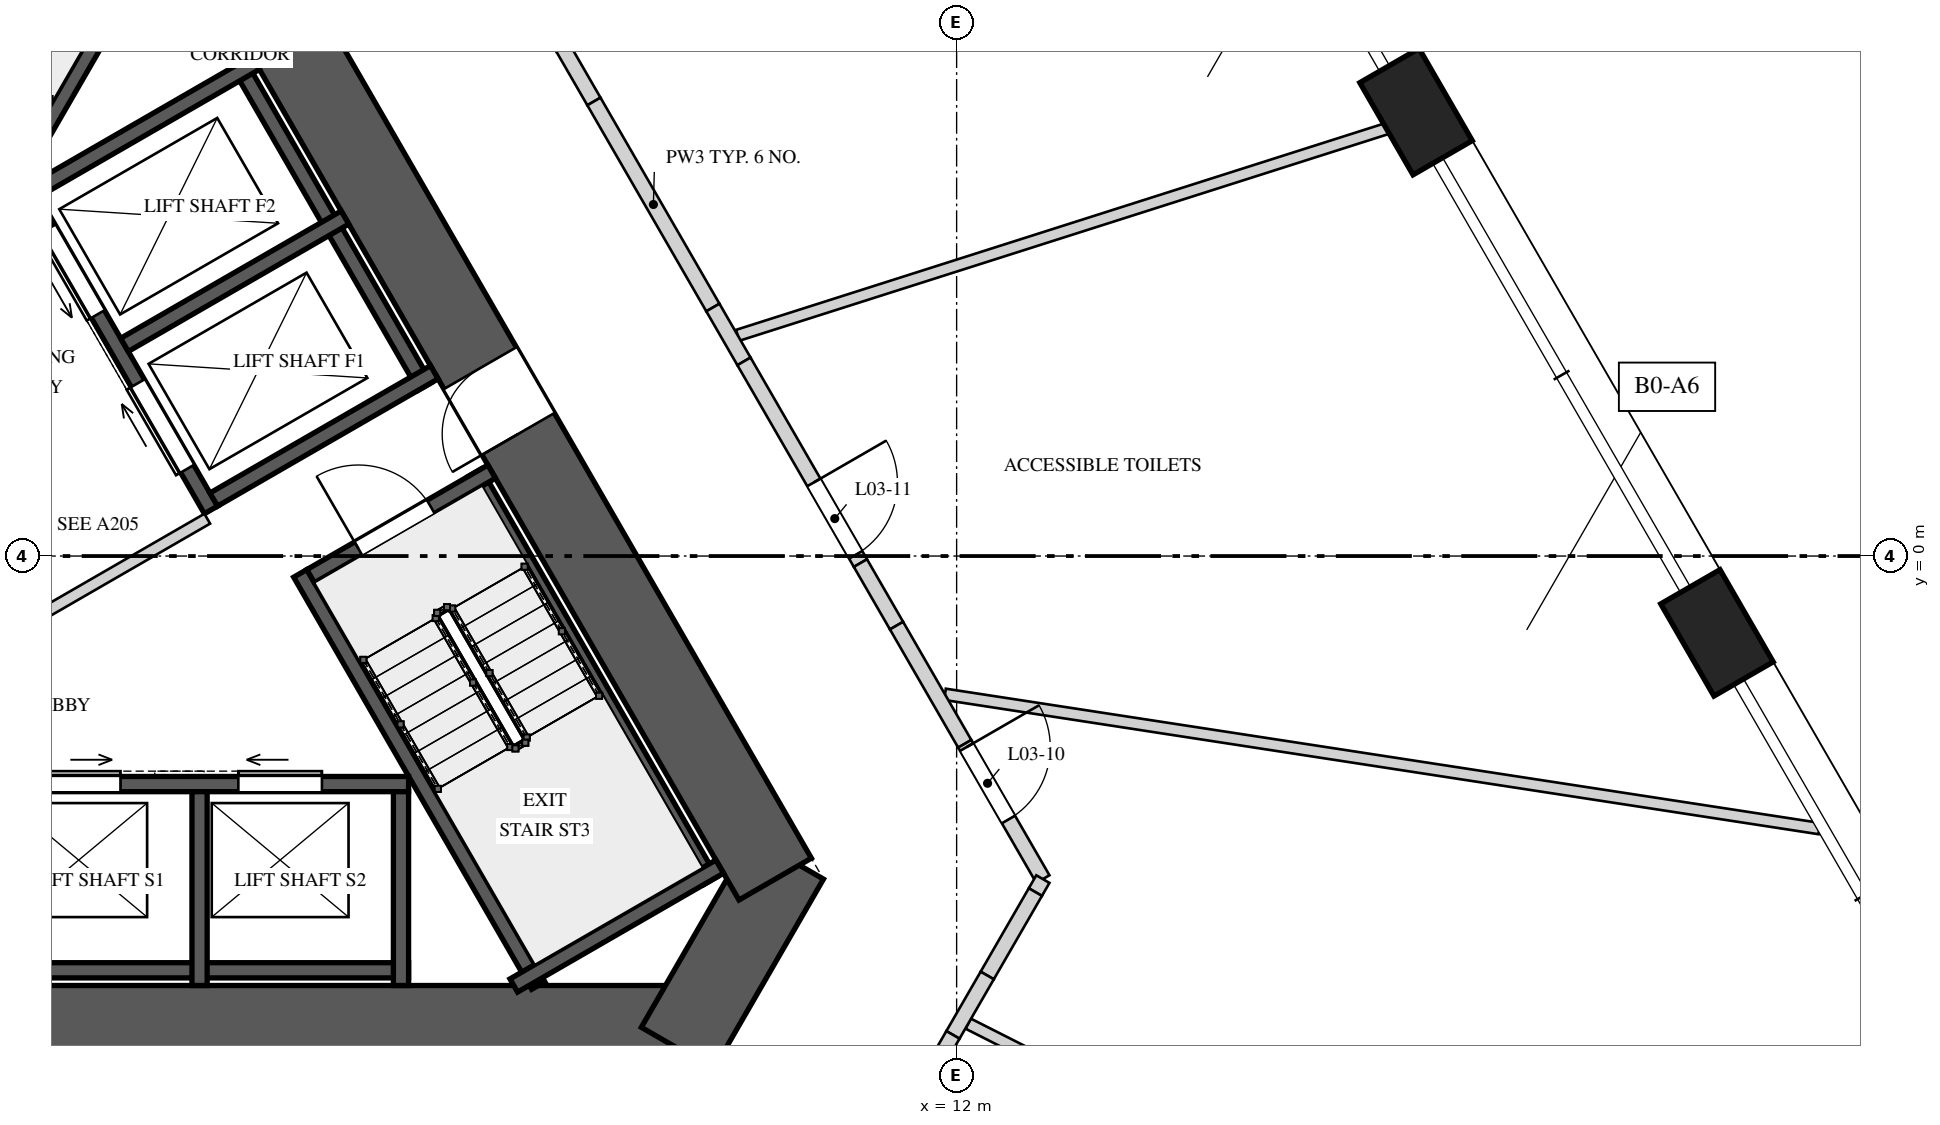
"""IFC4 building model, lengths in metres.
Left out: names, types, materials, properties, quantities, classifications, styles, units other than length and angle.
Written with IfcOpenShell. Run it as: python <this file> out.ifc"""

import sys

from ifc_helpers import new_model, si_unit, direction, frame, frame_2d, origin, origin_2d, place, context, subcontext, project, spatial, polyline, rectangle, outline, extrude, element, fill, save


model = new_model("IFC4")
c1 = context("Model", 3, precision=1e-05, world=origin(), true_north=direction((0.0, 1.0)))
c2 = subcontext(c1, "Body", "Model", "MODEL_VIEW")
j1 = project(units=[si_unit("LENGTHUNIT", "METRE"), si_unit("PLANEANGLEUNIT", "RADIAN")], contexts=[c1])
p1 = place(None, origin())
s1 = spatial("IfcSite", under=j1, at=p1, CompositionType="ELEMENT")
p2 = place(p1, origin())
s2 = spatial("IfcBuilding", under=s1, at=p2, CompositionType="ELEMENT")
p3 = place(p2, frame((0.0, 0.0, 20.0)))
s3 = spatial("IfcBuildingStorey", under=s2, at=p3, CompositionType="ELEMENT", Elevation=20.0)
p4 = place(p3, frame((-8.487, -6.2, 0.0), z_axis=(0.0, 0.0, 1.0), x_axis=(1.0, 0.0, 0.0)))
e1 = element("IfcWall", 1, at=p4, inside=s3, PredefinedType="SHEAR", context=c2, shape_type="SweptSolid", body=[
    extrude(rectangle(XDim=16.974, YDim=1.1, at=frame_2d((8.487, 0.0))), origin(), (0.0, 0.0, 1.0), 5.0),
])
p5 = place(p4, frame((6.692, 0.0, 0.0)))
e2 = element("IfcOpeningElement", 2, at=p5, cuts=e1, PredefinedType="OPENING", context=c2, shape_type="SweptSolid", body=[
    extrude(rectangle(XDim=1.0, YDim=2.4, at=frame_2d((0.5, 1.2))), frame((0.0, 0.56, 0.0), z_axis=(0.0, -1.0, 0.0), x_axis=(1.0, 0.0, 0.0)), (0.0, 0.0, 1.0), 1.12),
])
p6 = place(p3, frame((8.328, -6.475, 0.0), z_axis=(0.0, 0.0, 1.0), x_axis=(0.499995765644, 0.866027848477, 0.0)))
e3 = element("IfcWall", 3, at=p6, inside=s3, PredefinedType="SHEAR", context=c2, shape_type="SweptSolid", body=[
    extrude(rectangle(XDim=2.887, YDim=1.1, at=frame_2d((1.443, 0.0))), origin(), (0.0, 0.0, 1.0), 5.0),
])
p7 = place(p3, frame((9.613, -4.25, 0.0), z_axis=(0.0, 0.0, 1.0), x_axis=(-0.500001757713, 0.866024388966, 0.0)))
e4 = element("IfcWall", 4, at=p7, inside=s3, PredefinedType="SHEAR", context=c2, shape_type="SweptSolid", body=[
    extrude(rectangle(XDim=16.974, YDim=1.1, at=frame_2d((8.487, 0.0))), origin(), (0.0, 0.0, 1.0), 5.0),
])
p8 = place(p7, frame((6.762, 0.0, 0.0)))
e5 = element("IfcOpeningElement", 5, at=p8, cuts=e4, PredefinedType="OPENING", context=c2, shape_type="SweptSolid", body=[
    extrude(rectangle(XDim=1.0, YDim=2.4, at=frame_2d((0.5, 1.2))), frame((0.0, 0.56, 0.0), z_axis=(0.0, -1.0, 0.0), x_axis=(1.0, 0.0, 0.0)), (0.0, 0.0, 1.0), 1.12),
])
for number, where, z_axis, x_axis in (
    (6, (22.003, -1.011, 0.0), (0.0, 0.0, 1.0), (-0.5, 0.866, 0.0)),
    (7, (18.044, 5.846, 0.0), (0.0, 0.0, 1.0), (-0.5, 0.866, 0.0)),
):
    element("IfcColumn", number, at=place(p3, frame(where, z_axis=z_axis, x_axis=x_axis)), inside=s3, PredefinedType="COLUMN", context=c2, shape_type="SweptSolid", body=[
        extrude(rectangle(XDim=1.4, YDim=0.9, at=origin_2d()), origin(), (0.0, 0.0, 1.0), 5.0),
    ])
p9 = place(p3, frame((1.646, 8.45, 0.0), z_axis=(0.0, 0.0, 1.0), x_axis=(-0.500006002103, -0.866021938441, 0.0)))
e8 = element("IfcWall", 8, at=p9, inside=s3, PredefinedType="SOLIDWALL", context=c2, shape_type="SweptSolid", body=[
    extrude(rectangle(XDim=6.261, YDim=0.2, at=frame_2d((3.13, 0.0))), origin(), (0.0, 0.0, 1.0), 4.65),
])
p10 = place(p3, frame((8.76, -4.272, 0.0), z_axis=(0.0, 0.0, 1.0), x_axis=(-0.49998037582, 0.866036733513, 0.0)))
e9 = element("IfcWall", 9, at=p10, inside=s3, PredefinedType="SOLIDWALL", context=c2, shape_type="SweptSolid", body=[
    extrude(rectangle(XDim=6.2, YDim=0.2, at=frame_2d((3.1, 0.0))), origin(), (0.0, 0.0, 1.0), 4.65),
])
p11 = place(p3, frame((6.495, -5.65, 0.0), z_axis=(0.0, 0.0, 1.0), x_axis=(-0.499976754523, 0.866038824151, 0.0)))
e10 = element("IfcWall", 10, at=p11, inside=s3, PredefinedType="SOLIDWALL", context=c2, shape_type="SweptSolid", body=[
    extrude(rectangle(XDim=6.26, YDim=0.2, at=frame_2d((3.13, 0.0))), origin(), (0.0, 0.0, 1.0), 4.65),
])
p12 = place(p3, frame((6.174, -5.65, 0.0), z_axis=(0.0, 0.0, 1.0), x_axis=(0.866054327916, 0.499949898588, 0.0)))
e11 = element("IfcWall", 11, at=p12, inside=s3, PredefinedType="SOLIDWALL", context=c2, shape_type="SweptSolid", body=[
    extrude(rectangle(XDim=3.128, YDim=0.2, at=frame_2d((1.564, 0.0))), origin(), (0.0, 0.0, 1.0), 4.65),
])
p13 = place(p3, frame((3.501, -0.265, 0.0), z_axis=(0.0, 0.0, 1.0), x_axis=(0.866027397988, 0.499996545922, 0.0)))
e12 = element("IfcWall", 12, at=p13, inside=s3, PredefinedType="SOLIDWALL", context=c2, shape_type="SweptSolid", body=[
    extrude(rectangle(XDim=2.75, YDim=0.2, at=frame_2d((1.375, 0.0))), origin(), (0.0, 0.0, 1.0), 4.65),
])
p14 = place(p13, frame((0.725, 0.0, 0.0)))
e13 = element("IfcOpeningElement", 13, at=p14, cuts=e12, PredefinedType="OPENING", context=c2, shape_type="SweptSolid", body=[
    extrude(rectangle(XDim=1.1, YDim=2.4, at=frame_2d((0.55, 1.2))), frame((0.0, 0.11, 0.0), z_axis=(0.0, -1.0, 0.0), x_axis=(1.0, 0.0, 0.0)), (0.0, 0.0, 1.0), 0.22),
])
p15 = place(p3, frame((-0.71, -3.0, 0.0), z_axis=(0.0, 0.0, 1.0), x_axis=(1.0, 0.0, 0.0)))
e14 = element("IfcWall", 14, at=p15, inside=s3, PredefinedType="SOLIDWALL", context=c2, shape_type="SweptSolid", body=[
    extrude(rectangle(XDim=5.5, YDim=0.2, at=frame_2d((2.75, 0.0))), origin(), (0.0, 0.0, 1.0), 4.65),
])
p16 = place(p15, frame((0.61, 0.0, 0.0)))
e15 = element("IfcOpeningElement", 15, at=p16, cuts=e14, PredefinedType="OPENING", context=c2, shape_type="SweptSolid", body=[
    extrude(rectangle(XDim=1.1, YDim=2.1, at=frame_2d((0.55, 1.05))), frame((0.0, 0.11, 0.0), z_axis=(0.0, -1.0, 0.0), x_axis=(1.0, 0.0, 0.0)), (0.0, 0.0, 1.0), 0.22),
])
p17 = place(p15, frame((3.26, 0.0, 0.0)))
e16 = element("IfcOpeningElement", 16, at=p17, cuts=e14, PredefinedType="OPENING", context=c2, shape_type="SweptSolid", body=[
    extrude(rectangle(XDim=1.1, YDim=2.1, at=frame_2d((0.55, 1.05))), frame((0.0, 0.11, 0.0), z_axis=(0.0, -1.0, 0.0), x_axis=(1.0, 0.0, 0.0)), (0.0, 0.0, 1.0), 0.22),
])
p18 = place(p3, frame((-0.71, -5.45, 0.0), z_axis=(0.0, 0.0, 1.0), x_axis=(1.0, 0.0, 0.0)))
e17 = element("IfcWall", 17, at=p18, inside=s3, PredefinedType="SOLIDWALL", context=c2, shape_type="SweptSolid", body=[
    extrude(rectangle(XDim=5.5, YDim=0.2, at=frame_2d((2.75, 0.0))), origin(), (0.0, 0.0, 1.0), 4.65),
])
for number, where, z_axis, x_axis in (
    (18, (2.04, -3.1, 0.0), (0.0, 0.0, 1.0), (0.0, -1.0, 0.0)),
    (19, (4.69, -3.1, 0.0), (0.0, 0.0, 1.0), (0.0, -1.0, 0.0)),
):
    element("IfcWall", number, at=place(p3, frame(where, z_axis=z_axis, x_axis=x_axis)), inside=s3, PredefinedType="SOLIDWALL", context=c2, shape_type="SweptSolid", body=[
        extrude(rectangle(XDim=2.55, YDim=0.2, at=frame_2d((1.275, 0.0))), origin(), (0.0, 0.0, 1.0), 4.65),
    ])
p19 = place(p3, frame((2.19, 0.606, 0.0), z_axis=(0.0, 0.0, 1.0), x_axis=(-0.500002801628, 0.866023786258, 0.0)))
e20 = element("IfcWall", 20, at=p19, inside=s3, PredefinedType="SOLIDWALL", context=c2, shape_type="SweptSolid", body=[
    extrude(rectangle(XDim=4.9, YDim=0.2, at=frame_2d((2.45, 0.0))), origin(), (0.0, 0.0, 1.0), 4.65),
])
p20 = place(p19, frame((0.625, 0.0, 0.0)))
e21 = element("IfcOpeningElement", 21, at=p20, cuts=e20, PredefinedType="OPENING", context=c2, shape_type="SweptSolid", body=[
    extrude(rectangle(XDim=1.3, YDim=2.1, at=frame_2d((0.65, 1.05))), frame((0.0, 0.11, 0.0), z_axis=(0.0, -1.0, 0.0), x_axis=(1.0, 0.0, 0.0)), (0.0, 0.0, 1.0), 0.22),
])
p21 = place(p19, frame((2.975, 0.0, 0.0)))
e22 = element("IfcOpeningElement", 22, at=p21, cuts=e20, PredefinedType="OPENING", context=c2, shape_type="SweptSolid", body=[
    extrude(rectangle(XDim=1.3, YDim=2.1, at=frame_2d((0.65, 1.05))), frame((0.0, 0.11, 0.0), z_axis=(0.0, -1.0, 0.0), x_axis=(1.0, 0.0, 0.0)), (0.0, 0.0, 1.0), 0.22),
])
p22 = place(p3, frame((5.005, 2.231, 0.0), z_axis=(0.0, 0.0, 1.0), x_axis=(-0.500002801628, 0.866023786258, 0.0)))
e23 = element("IfcWall", 23, at=p22, inside=s3, PredefinedType="SOLIDWALL", context=c2, shape_type="SweptSolid", body=[
    extrude(rectangle(XDim=4.9, YDim=0.2, at=frame_2d((2.45, 0.0))), origin(), (0.0, 0.0, 1.0), 4.65),
])
p23 = place(p3, frame((2.227, 0.743, 0.0), z_axis=(0.0, 0.0, 1.0), x_axis=(0.866014461049, 0.500018952895, 0.0)))
e24 = element("IfcWall", 24, at=p23, inside=s3, PredefinedType="SOLIDWALL", context=c2, shape_type="SweptSolid", body=[
    extrude(rectangle(XDim=3.35, YDim=0.2, at=frame_2d((1.675, 0.0))), origin(), (0.0, 0.0, 1.0), 4.65),
])
p24 = place(p3, frame((1.052, 2.778, 0.0), z_axis=(0.0, 0.0, 1.0), x_axis=(0.866032680314, 0.499987396469, 0.0)))
e25 = element("IfcWall", 25, at=p24, inside=s3, PredefinedType="SOLIDWALL", context=c2, shape_type="SweptSolid", body=[
    extrude(rectangle(XDim=3.35, YDim=0.2, at=frame_2d((1.675, 0.0))), origin(), (0.0, 0.0, 1.0), 4.65),
])
p25 = place(p3, frame((-0.123, 4.813, 0.0), z_axis=(0.0, 0.0, 1.0), x_axis=(0.866014461049, 0.500018952895, 0.0)))
e26 = element("IfcWall", 26, at=p25, inside=s3, PredefinedType="SOLIDWALL", context=c2, shape_type="SweptSolid", body=[
    extrude(rectangle(XDim=3.35, YDim=0.2, at=frame_2d((1.675, 0.0))), origin(), (0.0, 0.0, 1.0), 4.65),
])
p26 = place(p3, frame((-0.717, -1.159, 0.0), z_axis=(0.0, 0.0, 1.0), x_axis=(0.866008176907, 0.50002983664, 0.0)))
e27 = element("IfcWall", 27, at=p26, inside=s3, PredefinedType="PARTITIONING", context=c2, shape_type="SweptSolid", body=[
    extrude(rectangle(XDim=3.3, YDim=0.15, at=frame_2d((1.65, 0.0))), origin(), (0.0, 0.0, 1.0), 4.65),
])
p27 = place(p3, frame((9.12, 2.904, 0.0), z_axis=(0.0, 0.0, 1.0), x_axis=(0.952860213553, 0.303409646233, 0.0)))
e28 = element("IfcWall", 28, at=p27, inside=s3, PredefinedType="PARTITIONING", context=c2, shape_type="SweptSolid", body=[
    extrude(rectangle(XDim=9.295, YDim=0.15, at=frame_2d((4.647, 0.0))), origin(), (0.0, 0.0, 1.0), 3.75),
])
p28 = place(p3, frame((11.847, -1.819, 0.0), z_axis=(0.0, 0.0, 1.0), x_axis=(0.988414820691, -0.151776619539, 0.0)))
e29 = element("IfcWall", 29, at=p28, inside=s3, PredefinedType="PARTITIONING", context=c2, shape_type="SweptSolid", body=[
    extrude(rectangle(XDim=11.639, YDim=0.15, at=frame_2d((5.82, 0.0))), origin(), (0.0, 0.0, 1.0), 4.65),
])
p29 = place(p3, frame((12.152, -6.152, 0.0), z_axis=(0.0, 0.0, 1.0), x_axis=(0.892189195248, -0.451661864542, 0.0)))
e30 = element("IfcWall", 30, at=p29, inside=s3, PredefinedType="PARTITIONING", context=c2, shape_type="SweptSolid", body=[
    extrude(rectangle(XDim=12.323, YDim=0.15, at=frame_2d((6.161, 0.0))), origin(), (0.0, 0.0, 1.0), 3.55),
])
p30 = place(p3, frame((6.819, 6.689, 0.0), z_axis=(0.0, 0.0, 1.0), x_axis=(0.500118501653, -0.865956976012, 0.0)))
e31 = element("IfcWall", 31, at=p30, inside=s3, PredefinedType="SOLIDWALL", context=c2, shape_type="SweptSolid", body=[
    extrude(rectangle(XDim=0.818, YDim=0.2, at=frame_2d((0.409, 0.0))), origin(), (0.0, 0.0, 1.0), 3.75),
])
p31 = place(p3, frame((7.228, 5.98, 0.0), z_axis=(0.0, 0.0, 1.0), x_axis=(0.499947505232, -0.866055709532, 0.0)))
e32 = element("IfcWall", 32, at=p31, inside=s3, PredefinedType="SOLIDWALL", context=c2, shape_type="SweptSolid", body=[
    extrude(rectangle(XDim=3.13, YDim=0.2, at=frame_2d((1.565, 0.0))), origin(), (0.0, 0.0, 1.0), 4.65),
])
p32 = place(p3, frame((8.793, 3.27, 0.0), z_axis=(0.0, 0.0, 1.0), x_axis=(0.500118501653, -0.865956976012, 0.0)))
e33 = element("IfcWall", 33, at=p32, inside=s3, PredefinedType="SOLIDWALL", context=c2, shape_type="SweptSolid", body=[
    extrude(rectangle(XDim=0.818, YDim=0.2, at=frame_2d((0.409, 0.0))), origin(), (0.0, 0.0, 1.0), 3.75),
])
p33 = place(p3, frame((9.202, 2.561, 0.0), z_axis=(0.0, 0.0, 1.0), x_axis=(0.499952348839, -0.866052913447, 0.0)))
e34 = element("IfcWall", 34, at=p33, inside=s3, PredefinedType="SOLIDWALL", context=c2, shape_type="SweptSolid", body=[
    extrude(rectangle(XDim=3.064, YDim=0.2, at=frame_2d((1.532, 0.0))), origin(), (0.0, 0.0, 1.0), 4.65),
])
p34 = place(p33, frame((1.839, 0.0, 0.0)))
e35 = element("IfcOpeningElement", 35, at=p34, cuts=e34, PredefinedType="OPENING", context=c2, shape_type="SweptSolid", body=[
    extrude(rectangle(XDim=1.1, YDim=2.4, at=frame_2d((0.55, 1.2))), frame((0.0, 0.11, 0.0), z_axis=(0.0, -1.0, 0.0), x_axis=(1.0, 0.0, 0.0)), (0.0, 0.0, 1.0), 0.22),
])
p35 = place(p3, frame((10.734, -0.093, 0.0), z_axis=(0.0, 0.0, 1.0), x_axis=(0.500174821557, -0.865924446982, 0.0)))
e36 = element("IfcWall", 36, at=p35, inside=s3, PredefinedType="SOLIDWALL", context=c2, shape_type="SweptSolid", body=[
    extrude(rectangle(XDim=0.95, YDim=0.2, at=frame_2d((0.475, 0.0))), origin(), (0.0, 0.0, 1.0), 3.75),
])
p36 = place(p3, frame((11.209, -0.915, 0.0), z_axis=(0.0, 0.0, 1.0), x_axis=(0.49994221372, -0.866058764138, 0.0)))
e37 = element("IfcWall", 37, at=p36, inside=s3, PredefinedType="SOLIDWALL", context=c2, shape_type="SweptSolid", body=[
    extrude(rectangle(XDim=1.795, YDim=0.2, at=frame_2d((0.897, 0.0))), origin(), (0.0, 0.0, 1.0), 4.65),
])
p37 = place(p3, frame((12.107, -2.47, 0.0), z_axis=(0.0, 0.0, 1.0), x_axis=(0.50004803122, -0.86599767117, 0.0)))
e38 = element("IfcWall", 38, at=p37, inside=s3, PredefinedType="SOLIDWALL", context=c2, shape_type="SweptSolid", body=[
    extrude(outline(polyline([(0.0, 0.0), (2.055, 0.0), (2.055, 3.55), (1.02, 3.55), (1.02, 4.65), (0.0, 4.65), (0.0, 0.0)])), frame((0.0, 0.1, 0.0), z_axis=(0.0, -1.0, 0.0), x_axis=(1.0, 0.0, 0.0)), (0.0, 0.0, 1.0), 0.2),
])
p38 = place(p37, frame((0.05, 0.0, 0.0)))
e39 = element("IfcOpeningElement", 39, at=p38, cuts=e38, PredefinedType="OPENING", context=c2, shape_type="SweptSolid", body=[
    extrude(rectangle(XDim=1.1, YDim=2.4, at=frame_2d((0.55, 1.2))), frame((0.0, 0.11, 0.0), z_axis=(0.0, -1.0, 0.0), x_axis=(1.0, 0.0, 0.0)), (0.0, 0.0, 1.0), 0.22),
])
p39 = place(p3, frame((13.135, -4.25, 0.0), z_axis=(0.0, 0.0, 1.0), x_axis=(-0.499865263774, -0.866103179807, 0.0)))
e40 = element("IfcWall", 40, at=p39, inside=s3, PredefinedType="SOLIDWALL", context=c2, shape_type="SweptSolid", body=[
    extrude(rectangle(XDim=0.197, YDim=0.2, at=frame_2d((0.099, 0.0))), origin(), (0.0, 0.0, 1.0), 3.55),
])
p40 = place(p3, frame((13.036, -4.421, 0.0), z_axis=(0.0, 0.0, 1.0), x_axis=(-0.500056058743, -0.865993035835, 0.0)))
e41 = element("IfcWall", 41, at=p40, inside=s3, PredefinedType="SOLIDWALL", context=c2, shape_type="SweptSolid", body=[
    extrude(rectangle(XDim=1.267, YDim=0.2, at=frame_2d((0.633, 0.0))), origin(), (0.0, 0.0, 1.0), 4.65),
])
p41 = place(p3, frame((12.403, -5.518, 0.0), z_axis=(0.0, 0.0, 1.0), x_axis=(-0.500097243556, -0.865969252911, 0.0)))
e42 = element("IfcWall", 42, at=p41, inside=s3, PredefinedType="SOLIDWALL", context=c2, shape_type="SweptSolid", body=[
    extrude(rectangle(XDim=0.902, YDim=0.2, at=frame_2d((0.451, 0.0))), origin(), (0.0, 0.0, 1.0), 3.55),
])
p42 = place(p3, frame((11.951, -6.299, 0.0), z_axis=(0.0, 0.0, 1.0), x_axis=(-0.499923988433, -0.866069284636, 0.0)))
e43 = element("IfcWall", 43, at=p42, inside=s3, PredefinedType="SOLIDWALL", context=c2, shape_type="SweptSolid", body=[
    extrude(rectangle(XDim=0.909, YDim=0.2, at=frame_2d((0.455, 0.0))), origin(), (0.0, 0.0, 1.0), 4.65),
])
p43 = place(p14, origin())
e44 = element("IfcDoor", 44, at=p43, inside=s3, OperationType="SINGLE_SWING_RIGHT", PredefinedType="DOOR", context=c2, shape_type="SweptSolid", body=[
    extrude(rectangle(XDim=1.1, YDim=2.4, at=frame_2d((0.55, 1.2))), frame((0.0, 0.025, 0.0), z_axis=(0.0, -1.0, 0.0), x_axis=(1.0, 0.0, 0.0)), (0.0, 0.0, 1.0), 0.05),
])
fill(e13, e44)
p44 = place(p16, origin())
e45 = element("IfcDoor", 45, at=p44, inside=s3, OperationType="SLIDING_TO_RIGHT", PredefinedType="DOOR", context=c2, shape_type="SweptSolid", body=[
    extrude(rectangle(XDim=1.1, YDim=2.1, at=frame_2d((0.55, 1.05))), frame((0.0, 0.025, 0.0), z_axis=(0.0, -1.0, 0.0), x_axis=(1.0, 0.0, 0.0)), (0.0, 0.0, 1.0), 0.05),
])
fill(e15, e45)
p45 = place(p17, origin())
e46 = element("IfcDoor", 46, at=p45, inside=s3, OperationType="SLIDING_TO_LEFT", PredefinedType="DOOR", context=c2, shape_type="SweptSolid", body=[
    extrude(rectangle(XDim=1.1, YDim=2.1, at=frame_2d((0.55, 1.05))), frame((0.0, 0.025, 0.0), z_axis=(0.0, -1.0, 0.0), x_axis=(1.0, 0.0, 0.0)), (0.0, 0.0, 1.0), 0.05),
])
fill(e16, e46)
p46 = place(p20, origin())
e47 = element("IfcDoor", 47, at=p46, inside=s3, OperationType="SLIDING_TO_RIGHT", PredefinedType="DOOR", context=c2, shape_type="SweptSolid", body=[
    extrude(rectangle(XDim=1.3, YDim=2.1, at=frame_2d((0.65, 1.05))), frame((0.0, 0.025, 0.0), z_axis=(0.0, -1.0, 0.0), x_axis=(1.0, 0.0, 0.0)), (0.0, 0.0, 1.0), 0.05),
])
fill(e21, e47)
p47 = place(p21, origin())
e48 = element("IfcDoor", 48, at=p47, inside=s3, OperationType="SLIDING_TO_LEFT", PredefinedType="DOOR", context=c2, shape_type="SweptSolid", body=[
    extrude(rectangle(XDim=1.3, YDim=2.1, at=frame_2d((0.65, 1.05))), frame((0.0, 0.025, 0.0), z_axis=(0.0, -1.0, 0.0), x_axis=(1.0, 0.0, 0.0)), (0.0, 0.0, 1.0), 0.05),
])
fill(e22, e48)
p48 = place(p8, origin())
e49 = element("IfcDoor", 49, at=p48, inside=s3, OperationType="SINGLE_SWING_LEFT", PredefinedType="DOOR", context=c2, shape_type="SweptSolid", body=[
    extrude(rectangle(XDim=1.0, YDim=2.4, at=frame_2d((0.5, 1.2))), frame((0.0, 0.025, 0.0), z_axis=(0.0, -1.0, 0.0), x_axis=(1.0, 0.0, 0.0)), (0.0, 0.0, 1.0), 0.05),
])
fill(e5, e49)
p49 = place(p38, origin())
e50 = element("IfcDoor", 50, at=p49, inside=s3, OperationType="SINGLE_SWING_RIGHT", PredefinedType="DOOR", context=c2, shape_type="SweptSolid", body=[
    extrude(rectangle(XDim=1.1, YDim=2.4, at=frame_2d((0.55, 1.2))), frame((0.0, 0.025, 0.0), z_axis=(0.0, -1.0, 0.0), x_axis=(1.0, 0.0, 0.0)), (0.0, 0.0, 1.0), 0.05),
])
fill(e39, e50)
p50 = place(p34, origin())
e51 = element("IfcDoor", 51, at=p50, inside=s3, OperationType="SINGLE_SWING_LEFT", PredefinedType="DOOR", context=c2, shape_type="SweptSolid", body=[
    extrude(rectangle(XDim=1.1, YDim=2.4, at=frame_2d((0.55, 1.2))), frame((0.0, 0.025, 0.0), z_axis=(0.0, -1.0, 0.0), x_axis=(1.0, 0.0, 0.0)), (0.0, 0.0, 1.0), 0.05),
])
fill(e35, e51)
save(model, sys.argv[1])
